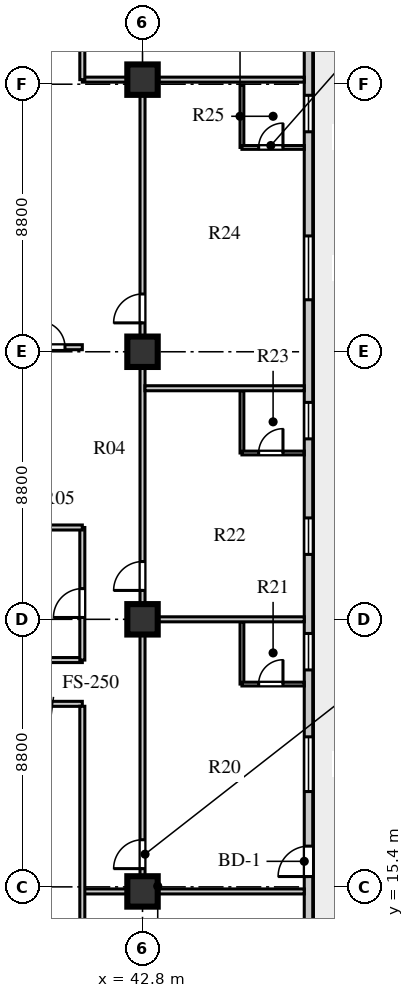
"""IFC4 building model, lengths in metres.
Left out: names, types, materials, properties, quantities, classifications, styles, units other than length and angle.
Written with IfcOpenShell. Run it as: python <this file> out.ifc"""

import sys

from ifc_helpers import new_model, si_unit, direction, frame, frame_2d, origin, origin_2d, place, context, subcontext, project, spatial, rectangle, extrude, element, fill, save


model = new_model("IFC4")
c1 = context("Model", 3, precision=1e-05, world=origin(), true_north=direction((0.0, 1.0)))
c2 = subcontext(c1, "Body", "Model", "MODEL_VIEW")
j1 = project(units=[si_unit("LENGTHUNIT", "METRE"), si_unit("PLANEANGLEUNIT", "RADIAN")], contexts=[c1])
p1 = place(None, origin())
s1 = spatial("IfcSite", under=j1, at=p1, CompositionType="ELEMENT")
p2 = place(p1, origin())
s2 = spatial("IfcBuilding", under=s1, at=p2, CompositionType="ELEMENT")
p3 = place(p2, frame((0.0, 0.0, 142.5)))
s3 = spatial("IfcBuildingStorey", under=s2, at=p3, CompositionType="ELEMENT", Elevation=142.5)
for number, where, z_axis, x_axis in (
    (1, (42.8, 15.25, 0.0), (0.0, 0.0, 1.0), (1.0, 0.0, 0.0)),
    (2, (42.8, 24.2, 0.0), (0.0, 0.0, 1.0), (1.0, 0.0, 0.0)),
    (3, (42.8, 33.0, 0.0), (0.0, 0.0, 1.0), (1.0, 0.0, 0.0)),
    (4, (42.8, 41.95, 0.0), (0.0, 0.0, 1.0), (1.0, 0.0, 0.0)),
):
    element("IfcColumn", number, at=place(p3, frame(where, z_axis=z_axis, x_axis=x_axis)), inside=s3, PredefinedType="COLUMN", context=c2, shape_type="SweptSolid", body=[
        extrude(rectangle(XDim=1.0, YDim=1.0, at=origin_2d()), origin(), (0.0, 0.0, 1.0), 3.6),
    ])
p4 = place(p3, frame((48.26, 13.33, 0.0), z_axis=(0.0, 0.0, 1.0), x_axis=(0.0, 1.0, 0.0)))
e5 = element("IfcWall", 5, at=p4, inside=s3, PredefinedType="STANDARD", context=c2, shape_type="SweptSolid", body=[
    extrude(rectangle(XDim=30.54, YDim=0.28, at=frame_2d((15.27, 0.0))), origin(), (0.0, 0.0, 1.0), 3.6),
])
p5 = place(p4, frame((2.41, 0.0, 0.0)))
e6 = element("IfcOpeningElement", 6, at=p5, cuts=e5, PredefinedType="OPENING", context=c2, shape_type="SweptSolid", body=[
    extrude(rectangle(XDim=1.0, YDim=2.05, at=frame_2d((0.5, 1.025))), frame((0.0, 0.15, 0.0), z_axis=(0.0, -1.0, 0.0), x_axis=(1.0, 0.0, 0.0)), (0.0, 0.0, 1.0), 0.3),
])
p6 = place(p4, frame((5.205, 0.0, 0.8)))
e7 = element("IfcOpeningElement", 7, at=p6, cuts=e5, PredefinedType="OPENING", context=c2, shape_type="SweptSolid", body=[
    extrude(rectangle(XDim=1.8, YDim=2.0, at=frame_2d((0.9, 1.0))), frame((0.0, 0.15, 0.0), z_axis=(0.0, -1.0, 0.0), x_axis=(1.0, 0.0, 0.0)), (0.0, 0.0, 1.0), 0.3),
])
p7 = place(p4, frame((9.205, 0.0, 0.8)))
e8 = element("IfcOpeningElement", 8, at=p7, cuts=e5, PredefinedType="OPENING", context=c2, shape_type="SweptSolid", body=[
    extrude(rectangle(XDim=1.2, YDim=1.75, at=frame_2d((0.6, 0.875))), frame((0.0, 0.15, 0.0), z_axis=(0.0, -1.0, 0.0), x_axis=(1.0, 0.0, 0.0)), (0.0, 0.0, 1.0), 0.3),
])
p8 = place(p4, frame((13.005, 0.0, 0.8)))
e9 = element("IfcOpeningElement", 9, at=p8, cuts=e5, PredefinedType="OPENING", context=c2, shape_type="SweptSolid", body=[
    extrude(rectangle(XDim=1.2, YDim=1.75, at=frame_2d((0.6, 0.875))), frame((0.0, 0.15, 0.0), z_axis=(0.0, -1.0, 0.0), x_axis=(1.0, 0.0, 0.0)), (0.0, 0.0, 1.0), 0.3),
])
p9 = place(p4, frame((16.805, 0.0, 0.8)))
e10 = element("IfcOpeningElement", 10, at=p9, cuts=e5, PredefinedType="OPENING", context=c2, shape_type="SweptSolid", body=[
    extrude(rectangle(XDim=1.2, YDim=1.75, at=frame_2d((0.6, 0.875))), frame((0.0, 0.15, 0.0), z_axis=(0.0, -1.0, 0.0), x_axis=(1.0, 0.0, 0.0)), (0.0, 0.0, 1.0), 0.3),
])
p10 = place(p4, frame((21.38, 0.0, 0.8)))
e11 = element("IfcOpeningElement", 11, at=p10, cuts=e5, PredefinedType="OPENING", context=c2, shape_type="SweptSolid", body=[
    extrude(rectangle(XDim=2.1, YDim=1.95, at=frame_2d((1.05, 0.975))), frame((0.0, 0.15, 0.0), z_axis=(0.0, -1.0, 0.0), x_axis=(1.0, 0.0, 0.0)), (0.0, 0.0, 1.0), 0.3),
])
p11 = place(p4, frame((26.905, 0.0, 0.8)))
e12 = element("IfcOpeningElement", 12, at=p11, cuts=e5, PredefinedType="OPENING", context=c2, shape_type="SweptSolid", body=[
    extrude(rectangle(XDim=1.2, YDim=1.75, at=frame_2d((0.6, 0.875))), frame((0.0, 0.15, 0.0), z_axis=(0.0, -1.0, 0.0), x_axis=(1.0, 0.0, 0.0)), (0.0, 0.0, 1.0), 0.3),
])
p12 = place(p3, frame((25.22, 21.42, 0.0), z_axis=(0.0, 0.0, 1.0), x_axis=(1.0, 0.0, 0.0)))
e13 = element("IfcWall", 13, at=p12, inside=s3, PredefinedType="PARTITIONING", context=c2, shape_type="SweptSolid", body=[
    extrude(rectangle(XDim=15.6, YDim=0.165, at=frame_2d((7.8, 0.0))), origin(), (0.0, 0.0, 1.0), 3.2),
])
p13 = place(p12, frame((0.63, 0.0, 0.0)))
e14 = element("IfcOpeningElement", 14, at=p13, cuts=e13, PredefinedType="OPENING", context=c2, shape_type="SweptSolid", body=[
    extrude(rectangle(XDim=0.9, YDim=2.08, at=frame_2d((0.45, 1.04))), frame((0.0, 0.093, 0.0), z_axis=(0.0, -1.0, 0.0), x_axis=(1.0, 0.0, 0.0)), (0.0, 0.0, 1.0), 0.185),
])
p14 = place(p12, frame((3.71, 0.0, 0.0)))
e15 = element("IfcOpeningElement", 15, at=p14, cuts=e13, PredefinedType="OPENING", context=c2, shape_type="SweptSolid", body=[
    extrude(rectangle(XDim=0.9, YDim=2.08, at=frame_2d((0.45, 1.04))), frame((0.0, 0.093, 0.0), z_axis=(0.0, -1.0, 0.0), x_axis=(1.0, 0.0, 0.0)), (0.0, 0.0, 1.0), 0.185),
])
p15 = place(p12, frame((6.81, 0.0, 0.0)))
e16 = element("IfcOpeningElement", 16, at=p15, cuts=e13, PredefinedType="OPENING", context=c2, shape_type="SweptSolid", body=[
    extrude(rectangle(XDim=0.9, YDim=2.08, at=frame_2d((0.45, 1.04))), frame((0.0, 0.093, 0.0), z_axis=(0.0, -1.0, 0.0), x_axis=(1.0, 0.0, 0.0)), (0.0, 0.0, 1.0), 0.185),
])
p16 = place(p12, frame((9.91, 0.0, 0.0)))
e17 = element("IfcOpeningElement", 17, at=p16, cuts=e13, PredefinedType="OPENING", context=c2, shape_type="SweptSolid", body=[
    extrude(rectangle(XDim=0.9, YDim=2.08, at=frame_2d((0.45, 1.04))), frame((0.0, 0.093, 0.0), z_axis=(0.0, -1.0, 0.0), x_axis=(1.0, 0.0, 0.0)), (0.0, 0.0, 1.0), 0.185),
])
p17 = place(p12, frame((13.01, 0.0, 0.0)))
e18 = element("IfcOpeningElement", 18, at=p17, cuts=e13, PredefinedType="OPENING", context=c2, shape_type="SweptSolid", body=[
    extrude(rectangle(XDim=0.9, YDim=2.08, at=frame_2d((0.45, 1.04))), frame((0.0, 0.093, 0.0), z_axis=(0.0, -1.0, 0.0), x_axis=(1.0, 0.0, 0.0)), (0.0, 0.0, 1.0), 0.185),
])
p18 = place(p3, frame((27.15, 22.86, 0.0), z_axis=(0.0, 0.0, 1.0), x_axis=(1.0, 0.0, 0.0)))
e19 = element("IfcWall", 19, at=p18, inside=s3, PredefinedType="PARTITIONING", context=c2, shape_type="SweptSolid", body=[
    extrude(rectangle(XDim=13.67, YDim=0.165, at=frame_2d((6.835, 0.0))), origin(), (0.0, 0.0, 1.0), 3.6),
])
p19 = place(p18, frame((2.2, 0.0, 0.0)))
e20 = element("IfcOpeningElement", 20, at=p19, cuts=e19, PredefinedType="OPENING", context=c2, shape_type="SweptSolid", body=[
    extrude(rectangle(XDim=0.9, YDim=2.08, at=frame_2d((0.45, 1.04))), frame((0.0, 0.093, 0.0), z_axis=(0.0, -1.0, 0.0), x_axis=(1.0, 0.0, 0.0)), (0.0, 0.0, 1.0), 0.185),
])
p20 = place(p3, frame((42.8, 15.25, 0.0), z_axis=(0.0, 0.0, 1.0), x_axis=(0.0, 1.0, 0.0)))
e21 = element("IfcWall", 21, at=p20, inside=s3, PredefinedType="PARTITIONING", context=c2, shape_type="SweptSolid", body=[
    extrude(rectangle(XDim=26.7, YDim=0.165, at=frame_2d((13.35, 0.0))), origin(), (0.0, 0.0, 1.0), 2.95),
])
p21 = place(p20, frame((0.75, 0.0, 0.0)))
e22 = element("IfcOpeningElement", 22, at=p21, cuts=e21, PredefinedType="OPENING", context=c2, shape_type="SweptSolid", body=[
    extrude(rectangle(XDim=0.95, YDim=2.1, at=frame_2d((0.475, 1.05))), frame((0.0, 0.093, 0.0), z_axis=(0.0, -1.0, 0.0), x_axis=(1.0, 0.0, 0.0)), (0.0, 0.0, 1.0), 0.185),
])
p22 = place(p20, frame((9.9, 0.0, 0.0)))
e23 = element("IfcOpeningElement", 23, at=p22, cuts=e21, PredefinedType="OPENING", context=c2, shape_type="SweptSolid", body=[
    extrude(rectangle(XDim=0.95, YDim=2.1, at=frame_2d((0.475, 1.05))), frame((0.0, 0.093, 0.0), z_axis=(0.0, -1.0, 0.0), x_axis=(1.0, 0.0, 0.0)), (0.0, 0.0, 1.0), 0.185),
])
p23 = place(p20, frame((18.7, 0.0, 0.0)))
e24 = element("IfcOpeningElement", 24, at=p23, cuts=e21, PredefinedType="OPENING", context=c2, shape_type="SweptSolid", body=[
    extrude(rectangle(XDim=0.95, YDim=2.1, at=frame_2d((0.475, 1.05))), frame((0.0, 0.093, 0.0), z_axis=(0.0, -1.0, 0.0), x_axis=(1.0, 0.0, 0.0)), (0.0, 0.0, 1.0), 0.185),
])
for number, where, z_axis, x_axis in (
    (25, (40.82, 15.25, 0.0), (0.0, 0.0, 1.0), (1.0, 0.0, 0.0)),
    (26, (40.82, 41.95, 0.0), (0.0, 0.0, 1.0), (1.0, 0.0, 0.0)),
):
    element("IfcWall", number, at=place(p3, frame(where, z_axis=z_axis, x_axis=x_axis)), inside=s3, PredefinedType="PARTITIONING", context=c2, shape_type="SweptSolid", body=[
        extrude(rectangle(XDim=7.3, YDim=0.165, at=frame_2d((3.65, 0.0))), origin(), (0.0, 0.0, 1.0), 2.95),
    ])
p24 = place(p3, frame((40.82, 22.86, 0.0), z_axis=(0.0, 0.0, 1.0), x_axis=(0.0, 1.0, 0.0)))
e27 = element("IfcWall", 27, at=p24, inside=s3, PredefinedType="PARTITIONING", context=c2, shape_type="SweptSolid", body=[
    extrude(rectangle(XDim=4.36, YDim=0.165, at=frame_2d((2.18, 0.0))), origin(), (0.0, 0.0, 1.0), 3.6),
])
p25 = place(p24, frame((1.4, 0.0, 0.0)))
e28 = element("IfcOpeningElement", 28, at=p25, cuts=e27, PredefinedType="OPENING", context=c2, shape_type="SweptSolid", body=[
    extrude(rectangle(XDim=0.95, YDim=2.1, at=frame_2d((0.475, 1.05))), frame((0.0, 0.093, 0.0), z_axis=(0.0, -1.0, 0.0), x_axis=(1.0, 0.0, 0.0)), (0.0, 0.0, 1.0), 0.185),
])
p26 = place(p3, frame((36.9, 27.22, 0.0), z_axis=(0.0, 0.0, 1.0), x_axis=(1.0, 0.0, 0.0)))
e29 = element("IfcWall", 29, at=p26, inside=s3, PredefinedType="PARTITIONING", context=c2, shape_type="SweptSolid", body=[
    extrude(rectangle(XDim=3.92, YDim=0.165, at=frame_2d((1.96, 0.0))), origin(), (0.0, 0.0, 1.0), 3.2),
])
p27 = place(p3, frame((40.82, 10.28, 0.0), z_axis=(0.0, 0.0, 1.0), x_axis=(0.0, 1.0, 0.0)))
e30 = element("IfcWall", 30, at=p27, inside=s3, PredefinedType="PARTITIONING", context=c2, shape_type="SweptSolid", body=[
    extrude(rectangle(XDim=11.06, YDim=0.165, at=frame_2d((5.53, 0.0))), origin(), (0.0, 0.0, 1.0), 3.6),
])
p28 = place(p3, frame((46.07, 22.07, 0.0), z_axis=(0.0, 0.0, 1.0), x_axis=(0.0, 1.0, 0.0)))
e31 = element("IfcWall", 31, at=p28, inside=s3, PredefinedType="PLUMBINGWALL", context=c2, shape_type="SweptSolid", body=[
    extrude(rectangle(XDim=2.05, YDim=0.125, at=frame_2d((1.025, 0.0))), origin(), (0.0, 0.0, 1.0), 3.6),
])
p29 = place(p3, frame((46.07, 22.07, 0.0), z_axis=(0.0, 0.0, 1.0), x_axis=(1.0, 0.0, 0.0)))
e32 = element("IfcWall", 32, at=p29, inside=s3, PredefinedType="PLUMBINGWALL", context=c2, shape_type="SweptSolid", body=[
    extrude(rectangle(XDim=2.05, YDim=0.125, at=frame_2d((1.025, 0.0))), origin(), (0.0, 0.0, 1.0), 3.6),
])
p30 = place(p29, frame((0.55, 0.0, 0.0)))
e33 = element("IfcOpeningElement", 33, at=p30, cuts=e32, PredefinedType="OPENING", context=c2, shape_type="SweptSolid", body=[
    extrude(rectangle(XDim=0.8, YDim=2.05, at=frame_2d((0.4, 1.025))), frame((0.0, 0.073, 0.0), z_axis=(0.0, -1.0, 0.0), x_axis=(1.0, 0.0, 0.0)), (0.0, 0.0, 1.0), 0.145),
])
p31 = place(p3, frame((42.88, 24.2, 0.0), z_axis=(0.0, 0.0, 1.0), x_axis=(1.0, 0.0, 0.0)))
e34 = element("IfcWall", 34, at=p31, inside=s3, PredefinedType="PARTITIONING", context=c2, shape_type="SweptSolid", body=[
    extrude(rectangle(XDim=5.24, YDim=0.165, at=frame_2d((2.62, 0.0))), origin(), (0.0, 0.0, 1.0), 3.1),
])
p32 = place(p3, frame((46.07, 29.67, 0.0), z_axis=(0.0, 0.0, 1.0), x_axis=(0.0, 1.0, 0.0)))
e35 = element("IfcWall", 35, at=p32, inside=s3, PredefinedType="PLUMBINGWALL", context=c2, shape_type="SweptSolid", body=[
    extrude(rectangle(XDim=2.05, YDim=0.125, at=frame_2d((1.025, 0.0))), origin(), (0.0, 0.0, 1.0), 3.6),
])
p33 = place(p3, frame((46.07, 29.67, 0.0), z_axis=(0.0, 0.0, 1.0), x_axis=(1.0, 0.0, 0.0)))
e36 = element("IfcWall", 36, at=p33, inside=s3, PredefinedType="PLUMBINGWALL", context=c2, shape_type="SweptSolid", body=[
    extrude(rectangle(XDim=2.05, YDim=0.125, at=frame_2d((1.025, 0.0))), origin(), (0.0, 0.0, 1.0), 3.6),
])
p34 = place(p33, frame((0.55, 0.0, 0.0)))
e37 = element("IfcOpeningElement", 37, at=p34, cuts=e36, PredefinedType="OPENING", context=c2, shape_type="SweptSolid", body=[
    extrude(rectangle(XDim=0.8, YDim=2.05, at=frame_2d((0.4, 1.025))), frame((0.0, 0.073, 0.0), z_axis=(0.0, -1.0, 0.0), x_axis=(1.0, 0.0, 0.0)), (0.0, 0.0, 1.0), 0.145),
])
p35 = place(p3, frame((42.88, 31.8, 0.0), z_axis=(0.0, 0.0, 1.0), x_axis=(1.0, 0.0, 0.0)))
e38 = element("IfcWall", 38, at=p35, inside=s3, PredefinedType="PARTITIONING", context=c2, shape_type="SweptSolid", body=[
    extrude(rectangle(XDim=5.24, YDim=0.165, at=frame_2d((2.62, 0.0))), origin(), (0.0, 0.0, 1.0), 3.6),
])
p36 = place(p3, frame((46.07, 39.72, 0.0), z_axis=(0.0, 0.0, 1.0), x_axis=(0.0, 1.0, 0.0)))
e39 = element("IfcWall", 39, at=p36, inside=s3, PredefinedType="PLUMBINGWALL", context=c2, shape_type="SweptSolid", body=[
    extrude(rectangle(XDim=2.05, YDim=0.125, at=frame_2d((1.025, 0.0))), origin(), (0.0, 0.0, 1.0), 3.6),
])
p37 = place(p3, frame((46.07, 39.72, 0.0), z_axis=(0.0, 0.0, 1.0), x_axis=(1.0, 0.0, 0.0)))
e40 = element("IfcWall", 40, at=p37, inside=s3, PredefinedType="PLUMBINGWALL", context=c2, shape_type="SweptSolid", body=[
    extrude(rectangle(XDim=2.05, YDim=0.125, at=frame_2d((1.025, 0.0))), origin(), (0.0, 0.0, 1.0), 3.6),
])
p38 = place(p37, frame((0.55, 0.0, 0.0)))
e41 = element("IfcOpeningElement", 41, at=p38, cuts=e40, PredefinedType="OPENING", context=c2, shape_type="SweptSolid", body=[
    extrude(rectangle(XDim=0.8, YDim=2.05, at=frame_2d((0.4, 1.025))), frame((0.0, 0.073, 0.0), z_axis=(0.0, -1.0, 0.0), x_axis=(1.0, 0.0, 0.0)), (0.0, 0.0, 1.0), 0.145),
])
p39 = place(p3, frame((38.95, 33.15, 0.0), z_axis=(0.0, 0.0, 1.0), x_axis=(1.0, 0.0, 0.0)))
e42 = element("IfcWall", 42, at=p39, inside=s3, PredefinedType="PARTITIONING", context=c2, shape_type="SweptSolid", body=[
    extrude(rectangle(XDim=1.87, YDim=0.165, at=frame_2d((0.935, 0.0))), origin(), (0.0, 0.0, 1.0), 3.6),
])
p40 = place(p39, frame((0.45, 0.0, 0.0)))
e43 = element("IfcOpeningElement", 43, at=p40, cuts=e42, PredefinedType="OPENING", context=c2, shape_type="SweptSolid", body=[
    extrude(rectangle(XDim=0.85, YDim=2.05, at=frame_2d((0.425, 1.025))), frame((0.0, 0.093, 0.0), z_axis=(0.0, -1.0, 0.0), x_axis=(1.0, 0.0, 0.0)), (0.0, 0.0, 1.0), 0.185),
])
p41 = place(p3, frame((40.82, 41.95, 0.0), z_axis=(0.0, 0.0, 1.0), x_axis=(0.0, 1.0, 0.0)))
e44 = element("IfcWall", 44, at=p41, inside=s3, PredefinedType="PARTITIONING", context=c2, shape_type="SweptSolid", body=[
    extrude(rectangle(XDim=4.97, YDim=0.165, at=frame_2d((2.485, 0.0))), origin(), (0.0, 0.0, 1.0), 3.6),
])
p42 = place(p5, frame((1.0, 0.0, 0.0), z_axis=(0.0, 0.0, 1.0), x_axis=(-1.0, 0.0, 0.0)))
e45 = element("IfcDoor", 45, at=p42, inside=s3, OperationType="SINGLE_SWING_RIGHT", PredefinedType="DOOR", context=c2, shape_type="SweptSolid", body=[
    extrude(rectangle(XDim=1.0, YDim=2.05, at=frame_2d((0.5, 1.025))), frame((0.0, 0.025, 0.0), z_axis=(0.0, -1.0, 0.0), x_axis=(1.0, 0.0, 0.0)), (0.0, 0.0, 1.0), 0.05),
])
fill(e6, e45)
p43 = place(p6, origin())
e46 = element("IfcWindow", 46, at=p43, inside=s3, PartitioningType="SINGLE_PANEL", PredefinedType="WINDOW", context=c2, shape_type="SweptSolid", body=[
    extrude(rectangle(XDim=1.8, YDim=2.0, at=frame_2d((0.9, 1.0))), frame((0.0, 0.03, 0.0), z_axis=(0.0, -1.0, 0.0), x_axis=(1.0, 0.0, 0.0)), (0.0, 0.0, 1.0), 0.06),
])
fill(e7, e46)
p44 = place(p7, origin())
e47 = element("IfcWindow", 47, at=p44, inside=s3, PartitioningType="SINGLE_PANEL", PredefinedType="WINDOW", context=c2, shape_type="SweptSolid", body=[
    extrude(rectangle(XDim=1.2, YDim=1.75, at=frame_2d((0.6, 0.875))), frame((0.0, 0.03, 0.0), z_axis=(0.0, -1.0, 0.0), x_axis=(1.0, 0.0, 0.0)), (0.0, 0.0, 1.0), 0.06),
])
fill(e8, e47)
p45 = place(p8, origin())
e48 = element("IfcWindow", 48, at=p45, inside=s3, PartitioningType="SINGLE_PANEL", PredefinedType="WINDOW", context=c2, shape_type="SweptSolid", body=[
    extrude(rectangle(XDim=1.2, YDim=1.75, at=frame_2d((0.6, 0.875))), frame((0.0, 0.03, 0.0), z_axis=(0.0, -1.0, 0.0), x_axis=(1.0, 0.0, 0.0)), (0.0, 0.0, 1.0), 0.06),
])
fill(e9, e48)
p46 = place(p9, origin())
e49 = element("IfcWindow", 49, at=p46, inside=s3, PartitioningType="SINGLE_PANEL", PredefinedType="WINDOW", context=c2, shape_type="SweptSolid", body=[
    extrude(rectangle(XDim=1.2, YDim=1.75, at=frame_2d((0.6, 0.875))), frame((0.0, 0.03, 0.0), z_axis=(0.0, -1.0, 0.0), x_axis=(1.0, 0.0, 0.0)), (0.0, 0.0, 1.0), 0.06),
])
fill(e10, e49)
p47 = place(p10, origin())
e50 = element("IfcWindow", 50, at=p47, inside=s3, PartitioningType="SINGLE_PANEL", PredefinedType="WINDOW", context=c2, shape_type="SweptSolid", body=[
    extrude(rectangle(XDim=2.1, YDim=1.95, at=frame_2d((1.05, 0.975))), frame((0.0, 0.03, 0.0), z_axis=(0.0, -1.0, 0.0), x_axis=(1.0, 0.0, 0.0)), (0.0, 0.0, 1.0), 0.06),
])
fill(e11, e50)
p48 = place(p11, origin())
e51 = element("IfcWindow", 51, at=p48, inside=s3, PartitioningType="SINGLE_PANEL", PredefinedType="WINDOW", context=c2, shape_type="SweptSolid", body=[
    extrude(rectangle(XDim=1.2, YDim=1.75, at=frame_2d((0.6, 0.875))), frame((0.0, 0.03, 0.0), z_axis=(0.0, -1.0, 0.0), x_axis=(1.0, 0.0, 0.0)), (0.0, 0.0, 1.0), 0.06),
])
fill(e12, e51)
p49 = place(p25, frame((0.95, 0.0, 0.0), z_axis=(0.0, 0.0, 1.0), x_axis=(-1.0, 0.0, 0.0)))
e52 = element("IfcDoor", 52, at=p49, inside=s3, OperationType="SINGLE_SWING_RIGHT", PredefinedType="DOOR", context=c2, shape_type="SweptSolid", body=[
    extrude(rectangle(XDim=0.95, YDim=2.1, at=frame_2d((0.475, 1.05))), frame((0.0, 0.025, 0.0), z_axis=(0.0, -1.0, 0.0), x_axis=(1.0, 0.0, 0.0)), (0.0, 0.0, 1.0), 0.05),
])
fill(e28, e52)
p50 = place(p21, origin())
e53 = element("IfcDoor", 53, at=p50, inside=s3, OperationType="SINGLE_SWING_LEFT", PredefinedType="DOOR", context=c2, shape_type="SweptSolid", body=[
    extrude(rectangle(XDim=0.95, YDim=2.1, at=frame_2d((0.475, 1.05))), frame((0.0, 0.025, 0.0), z_axis=(0.0, -1.0, 0.0), x_axis=(1.0, 0.0, 0.0)), (0.0, 0.0, 1.0), 0.05),
])
fill(e22, e53)
p51 = place(p30, frame((0.8, 0.0, 0.0), z_axis=(0.0, 0.0, 1.0), x_axis=(-1.0, 0.0, 0.0)))
e54 = element("IfcDoor", 54, at=p51, inside=s3, OperationType="SINGLE_SWING_LEFT", PredefinedType="DOOR", context=c2, shape_type="SweptSolid", body=[
    extrude(rectangle(XDim=0.8, YDim=2.05, at=frame_2d((0.4, 1.025))), frame((0.0, 0.025, 0.0), z_axis=(0.0, -1.0, 0.0), x_axis=(1.0, 0.0, 0.0)), (0.0, 0.0, 1.0), 0.05),
])
fill(e33, e54)
p52 = place(p22, origin())
e55 = element("IfcDoor", 55, at=p52, inside=s3, OperationType="SINGLE_SWING_LEFT", PredefinedType="DOOR", context=c2, shape_type="SweptSolid", body=[
    extrude(rectangle(XDim=0.95, YDim=2.1, at=frame_2d((0.475, 1.05))), frame((0.0, 0.025, 0.0), z_axis=(0.0, -1.0, 0.0), x_axis=(1.0, 0.0, 0.0)), (0.0, 0.0, 1.0), 0.05),
])
fill(e23, e55)
p53 = place(p34, frame((0.8, 0.0, 0.0), z_axis=(0.0, 0.0, 1.0), x_axis=(-1.0, 0.0, 0.0)))
e56 = element("IfcDoor", 56, at=p53, inside=s3, OperationType="SINGLE_SWING_LEFT", PredefinedType="DOOR", context=c2, shape_type="SweptSolid", body=[
    extrude(rectangle(XDim=0.8, YDim=2.05, at=frame_2d((0.4, 1.025))), frame((0.0, 0.025, 0.0), z_axis=(0.0, -1.0, 0.0), x_axis=(1.0, 0.0, 0.0)), (0.0, 0.0, 1.0), 0.05),
])
fill(e37, e56)
p54 = place(p23, origin())
e57 = element("IfcDoor", 57, at=p54, inside=s3, OperationType="SINGLE_SWING_LEFT", PredefinedType="DOOR", context=c2, shape_type="SweptSolid", body=[
    extrude(rectangle(XDim=0.95, YDim=2.1, at=frame_2d((0.475, 1.05))), frame((0.0, 0.025, 0.0), z_axis=(0.0, -1.0, 0.0), x_axis=(1.0, 0.0, 0.0)), (0.0, 0.0, 1.0), 0.05),
])
fill(e24, e57)
p55 = place(p38, frame((0.8, 0.0, 0.0), z_axis=(0.0, 0.0, 1.0), x_axis=(-1.0, 0.0, 0.0)))
e58 = element("IfcDoor", 58, at=p55, inside=s3, OperationType="SINGLE_SWING_LEFT", PredefinedType="DOOR", context=c2, shape_type="SweptSolid", body=[
    extrude(rectangle(XDim=0.8, YDim=2.05, at=frame_2d((0.4, 1.025))), frame((0.0, 0.025, 0.0), z_axis=(0.0, -1.0, 0.0), x_axis=(1.0, 0.0, 0.0)), (0.0, 0.0, 1.0), 0.05),
])
fill(e41, e58)
p56 = place(p40, origin())
e59 = element("IfcDoor", 59, at=p56, inside=s3, OperationType="SINGLE_SWING_LEFT", PredefinedType="DOOR", context=c2, shape_type="SweptSolid", body=[
    extrude(rectangle(XDim=0.85, YDim=2.05, at=frame_2d((0.425, 1.025))), frame((0.0, 0.025, 0.0), z_axis=(0.0, -1.0, 0.0), x_axis=(1.0, 0.0, 0.0)), (0.0, 0.0, 1.0), 0.05),
])
fill(e43, e59)
save(model, sys.argv[1])
